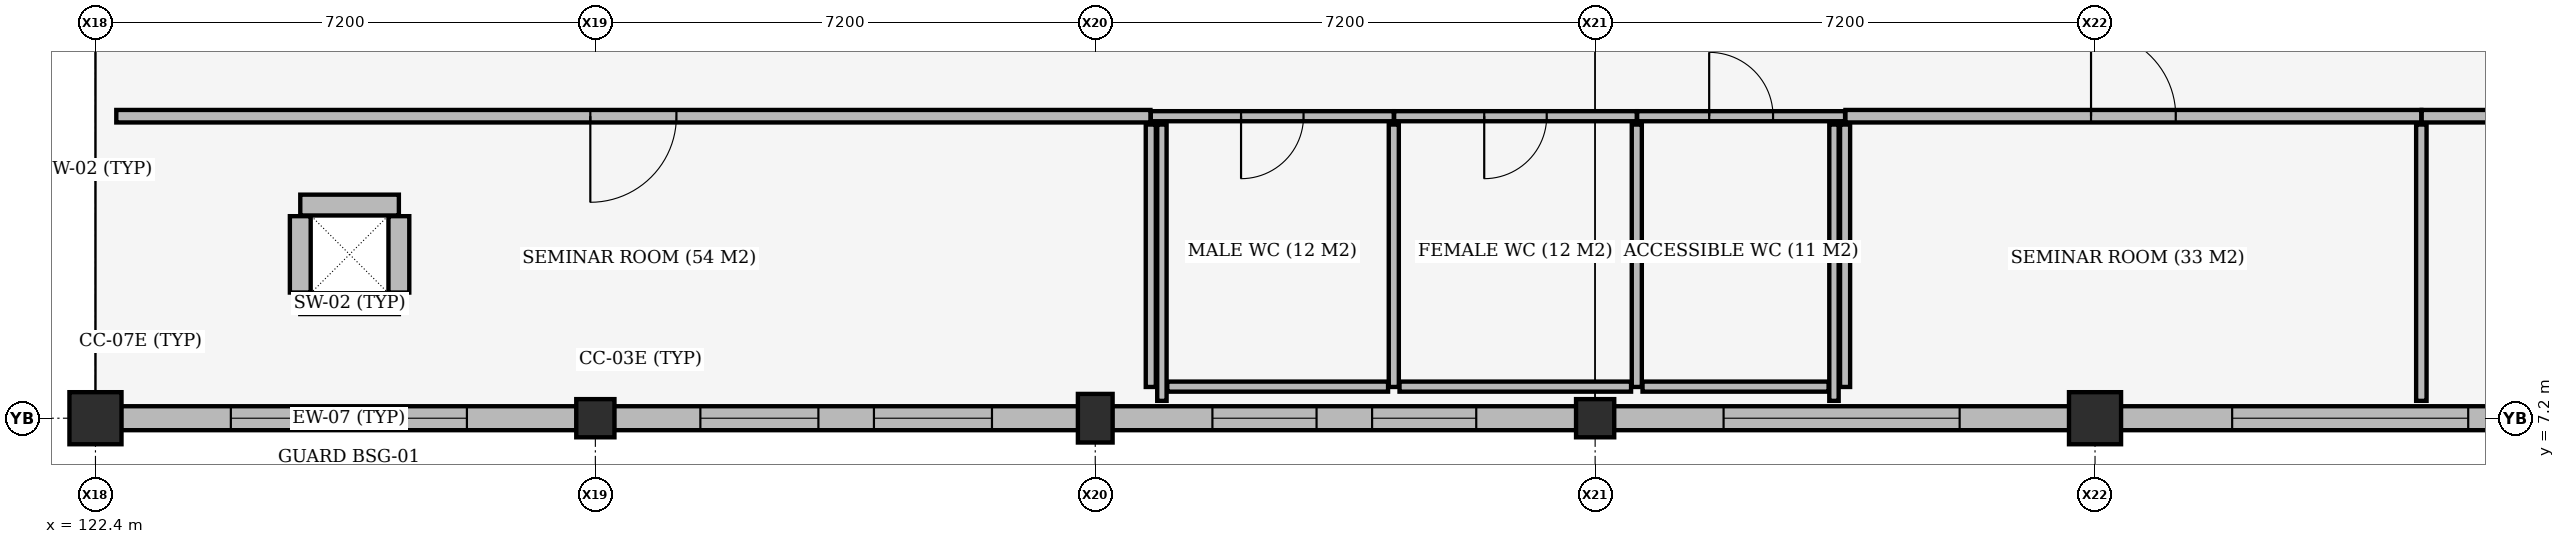
"""IFC4 building model, lengths in metres.
Left out: names, types, materials, properties, quantities, classifications, styles, units other than length and angle.
Written with IfcOpenShell. Run it as: python <this file> out.ifc"""

import sys

from ifc_helpers import new_model, si_unit, direction, frame, frame_2d, origin, origin_2d, place, context, subcontext, project, spatial, rectangle, extrude, element, fill, save


model = new_model("IFC4")
c1 = context("Model", 3, precision=1e-05, world=origin(), true_north=direction((0.0, 1.0)))
c2 = subcontext(c1, "Body", "Model", "MODEL_VIEW")
j1 = project(units=[si_unit("LENGTHUNIT", "METRE"), si_unit("PLANEANGLEUNIT", "RADIAN")], contexts=[c1])
p1 = place(None, origin())
s1 = spatial("IfcSite", under=j1, at=p1, CompositionType="ELEMENT")
p2 = place(p1, origin())
s2 = spatial("IfcBuilding", under=s1, at=p2, CompositionType="ELEMENT")
p3 = place(p2, frame((0.0, 0.0, 5.4)))
s3 = spatial("IfcBuildingStorey", under=s2, at=p3, CompositionType="ELEMENT", Elevation=5.4)
p4 = place(p3, frame((125.35, 8.85, 0.0), z_axis=(0.0, 0.0, 1.0), x_axis=(1.0, 0.0, 0.0)))
e1 = element("IfcWall", 1, at=p4, inside=s3, PredefinedType="SHEAR", context=c2, shape_type="SweptSolid", body=[
    extrude(rectangle(XDim=1.42, YDim=0.3, at=frame_2d((0.71, 0.0))), origin(), (0.0, 0.0, 1.0), 3.96),
])
p5 = place(p3, frame((126.77, 9.01, 0.0), z_axis=(0.0, 0.0, 1.0), x_axis=(0.0, 1.0, 0.0)))
e2 = element("IfcWall", 2, at=p5, inside=s3, PredefinedType="SHEAR", context=c2, shape_type="SweptSolid", body=[
    extrude(rectangle(XDim=1.1, YDim=0.3, at=frame_2d((0.55, 0.0))), origin(), (0.0, 0.0, 1.0), 3.96),
])
p6 = place(p3, frame((126.77, 10.27, 0.0), z_axis=(0.0, 0.0, 1.0), x_axis=(-1.0, 0.0, 0.0)))
e3 = element("IfcWall", 3, at=p6, inside=s3, PredefinedType="SHEAR", context=c2, shape_type="SweptSolid", body=[
    extrude(rectangle(XDim=1.42, YDim=0.3, at=frame_2d((0.71, 0.0))), origin(), (0.0, 0.0, 1.0), 3.96),
])
p7 = place(p3, frame((125.35, 10.11, 0.0), z_axis=(0.0, 0.0, 1.0), x_axis=(0.0, -1.0, 0.0)))
e4 = element("IfcWall", 4, at=p7, inside=s3, PredefinedType="SHEAR", context=c2, shape_type="SweptSolid", body=[
    extrude(rectangle(XDim=1.1, YDim=0.3, at=frame_2d((0.55, 0.0))), origin(), (0.0, 0.0, 1.0), 3.96),
])
p8 = place(p3, frame((122.4, 7.2, 0.0), z_axis=(0.0, 0.0, 1.0), x_axis=(1.0, 0.0, 0.0)))
e5 = element("IfcColumn", 5, at=p8, inside=s3, PredefinedType="COLUMN", context=c2, shape_type="SweptSolid", body=[
    extrude(rectangle(XDim=0.75, YDim=0.75, at=origin_2d()), origin(), (0.0, 0.0, 1.0), 3.85),
])
p9 = place(p3, frame((129.6, 7.2, 0.0), z_axis=(0.0, 0.0, 1.0), x_axis=(1.0, 0.0, 0.0)))
e6 = element("IfcColumn", 6, at=p9, inside=s3, PredefinedType="COLUMN", context=c2, shape_type="SweptSolid", body=[
    extrude(rectangle(XDim=0.55, YDim=0.55, at=origin_2d()), origin(), (0.0, 0.0, 1.0), 3.85),
])
p10 = place(p3, frame((136.8, 7.2, 0.0), z_axis=(0.0, 0.0, 1.0), x_axis=(1.0, 0.0, 0.0)))
e7 = element("IfcColumn", 7, at=p10, inside=s3, PredefinedType="COLUMN", context=c2, shape_type="SweptSolid", body=[
    extrude(rectangle(XDim=0.5, YDim=0.7, at=origin_2d()), origin(), (0.0, 0.0, 1.0), 3.85),
])
p11 = place(p3, frame((144.0, 7.2, 0.0), z_axis=(0.0, 0.0, 1.0), x_axis=(1.0, 0.0, 0.0)))
e8 = element("IfcColumn", 8, at=p11, inside=s3, PredefinedType="COLUMN", context=c2, shape_type="SweptSolid", body=[
    extrude(rectangle(XDim=0.55, YDim=0.55, at=origin_2d()), origin(), (0.0, 0.0, 1.0), 3.85),
])
p12 = place(p3, frame((151.2, 7.2, 0.0), z_axis=(0.0, 0.0, 1.0), x_axis=(1.0, 0.0, 0.0)))
e9 = element("IfcColumn", 9, at=p12, inside=s3, PredefinedType="COLUMN", context=c2, shape_type="SweptSolid", body=[
    extrude(rectangle(XDim=0.75, YDim=0.75, at=origin_2d()), origin(), (0.0, 0.0, 1.0), 3.85),
])
p13 = place(p3, frame((129.333, 7.2, 0.0), z_axis=(0.0, 0.0, 1.0), x_axis=(-1.0, 0.0, 0.0)))
e10 = element("IfcWall", 10, at=p13, inside=s3, PredefinedType="STANDARD", context=c2, shape_type="SweptSolid", body=[
    extrude(rectangle(XDim=6.566, YDim=0.345, at=frame_2d((3.283, 0.0))), origin(), (0.0, 0.0, 1.0), 3.33),
])
p14 = place(p13, frame((1.583, 0.0, 0.9)))
e11 = element("IfcOpeningElement", 11, at=p14, cuts=e10, PredefinedType="OPENING", context=c2, shape_type="SweptSolid", body=[
    extrude(rectangle(XDim=3.4, YDim=1.5, at=frame_2d((1.7, 0.75))), frame((0.0, 0.182, 0.0), z_axis=(0.0, -1.0, 0.0), x_axis=(1.0, 0.0, 0.0)), (0.0, 0.0, 1.0), 0.365),
])
p15 = place(p3, frame((136.558, 7.2, 0.0), z_axis=(0.0, 0.0, 1.0), x_axis=(-1.0, 0.0, 0.0)))
e12 = element("IfcWall", 12, at=p15, inside=s3, PredefinedType="STANDARD", context=c2, shape_type="SweptSolid", body=[
    extrude(rectangle(XDim=6.691, YDim=0.345, at=frame_2d((3.346, 0.0))), origin(), (0.0, 0.0, 1.0), 3.27),
])
p16 = place(p15, frame((1.246, 0.0, 0.95)))
e13 = element("IfcOpeningElement", 13, at=p16, cuts=e12, PredefinedType="OPENING", context=c2, shape_type="SweptSolid", body=[
    extrude(rectangle(XDim=1.7, YDim=2.1, at=frame_2d((0.85, 1.05))), frame((0.0, 0.182, 0.0), z_axis=(0.0, -1.0, 0.0), x_axis=(1.0, 0.0, 0.0)), (0.0, 0.0, 1.0), 0.365),
])
p17 = place(p15, frame((3.746, 0.0, 0.95)))
e14 = element("IfcOpeningElement", 14, at=p17, cuts=e12, PredefinedType="OPENING", context=c2, shape_type="SweptSolid", body=[
    extrude(rectangle(XDim=1.7, YDim=2.1, at=frame_2d((0.85, 1.05))), frame((0.0, 0.182, 0.0), z_axis=(0.0, -1.0, 0.0), x_axis=(1.0, 0.0, 0.0)), (0.0, 0.0, 1.0), 0.365),
])
p18 = place(p3, frame((143.733, 7.2, 0.0), z_axis=(0.0, 0.0, 1.0), x_axis=(-1.0, 0.0, 0.0)))
e15 = element("IfcWall", 15, at=p18, inside=s3, PredefinedType="STANDARD", context=c2, shape_type="SweptSolid", body=[
    extrude(rectangle(XDim=6.691, YDim=0.345, at=frame_2d((3.345, 0.0))), origin(), (0.0, 0.0, 1.0), 3.21),
])
p19 = place(p18, frame((1.446, 0.0, 0.95)))
e16 = element("IfcOpeningElement", 16, at=p19, cuts=e15, PredefinedType="OPENING", context=c2, shape_type="SweptSolid", body=[
    extrude(rectangle(XDim=1.5, YDim=2.1, at=frame_2d((0.75, 1.05))), frame((0.0, 0.182, 0.0), z_axis=(0.0, -1.0, 0.0), x_axis=(1.0, 0.0, 0.0)), (0.0, 0.0, 1.0), 0.365),
])
p20 = place(p18, frame((3.746, 0.0, 0.95)))
e17 = element("IfcOpeningElement", 17, at=p20, cuts=e15, PredefinedType="OPENING", context=c2, shape_type="SweptSolid", body=[
    extrude(rectangle(XDim=1.5, YDim=2.1, at=frame_2d((0.75, 1.05))), frame((0.0, 0.182, 0.0), z_axis=(0.0, -1.0, 0.0), x_axis=(1.0, 0.0, 0.0)), (0.0, 0.0, 1.0), 0.365),
])
p21 = place(p3, frame((150.833, 7.2, 0.0), z_axis=(0.0, 0.0, 1.0), x_axis=(-1.0, 0.0, 0.0)))
e18 = element("IfcWall", 18, at=p21, inside=s3, PredefinedType="STANDARD", context=c2, shape_type="SweptSolid", body=[
    extrude(rectangle(XDim=6.566, YDim=0.345, at=frame_2d((3.283, 0.0))), origin(), (0.0, 0.0, 1.0), 3.17),
])
p22 = place(p21, frame((1.583, 0.0, 0.9)))
e19 = element("IfcOpeningElement", 19, at=p22, cuts=e18, PredefinedType="OPENING", context=c2, shape_type="SweptSolid", body=[
    extrude(rectangle(XDim=3.4, YDim=1.5, at=frame_2d((1.7, 0.75))), frame((0.0, 0.182, 0.0), z_axis=(0.0, -1.0, 0.0), x_axis=(1.0, 0.0, 0.0)), (0.0, 0.0, 1.0), 0.365),
])
p23 = place(p3, frame((158.183, 7.2, 0.0), z_axis=(0.0, 0.0, 1.0), x_axis=(-1.0, 0.0, 0.0)))
e20 = element("IfcWall", 20, at=p23, inside=s3, PredefinedType="STANDARD", context=c2, shape_type="SweptSolid", body=[
    extrude(rectangle(XDim=6.616, YDim=0.345, at=frame_2d((3.308, 0.0))), origin(), (0.0, 0.0, 1.0), 3.11),
])
p24 = place(p23, frame((1.608, 0.0, 0.9)))
e21 = element("IfcOpeningElement", 21, at=p24, cuts=e20, PredefinedType="OPENING", context=c2, shape_type="SweptSolid", body=[
    extrude(rectangle(XDim=3.4, YDim=1.5, at=frame_2d((1.7, 0.75))), frame((0.0, 0.182, 0.0), z_axis=(0.0, -1.0, 0.0), x_axis=(1.0, 0.0, 0.0)), (0.0, 0.0, 1.0), 0.365),
])
p25 = place(p3, frame((137.6, 11.55, 0.0), z_axis=(0.0, 0.0, 1.0), x_axis=(1.0, 0.0, 0.0)))
e22 = element("IfcWall", 22, at=p25, inside=s3, PredefinedType="PLUMBINGWALL", context=c2, shape_type="SweptSolid", body=[
    extrude(rectangle(XDim=3.5, YDim=0.145, at=frame_2d((1.75, 0.0))), origin(), (0.0, 0.0, 1.0), 3.61),
])
p26 = place(p25, frame((1.3, 0.0, 0.0)))
e23 = element("IfcOpeningElement", 23, at=p26, cuts=e22, PredefinedType="OPENING", context=c2, shape_type="SweptSolid", body=[
    extrude(rectangle(XDim=0.9, YDim=2.1, at=frame_2d((0.45, 1.05))), frame((0.0, 0.083, 0.0), z_axis=(0.0, -1.0, 0.0), x_axis=(1.0, 0.0, 0.0)), (0.0, 0.0, 1.0), 0.165),
])
for number, where, z_axis, x_axis in (
    (24, (137.6, 7.65, 0.0), (0.0, 0.0, 1.0), (0.0, 1.0, 0.0)),
    (25, (141.1, 7.65, 0.0), (0.0, 0.0, 1.0), (0.0, 1.0, 0.0)),
):
    element("IfcWall", number, at=place(p3, frame(where, z_axis=z_axis, x_axis=x_axis)), inside=s3, PredefinedType="PLUMBINGWALL", context=c2, shape_type="SweptSolid", body=[
        extrude(rectangle(XDim=3.78, YDim=0.145, at=frame_2d((1.89, 0.0))), origin(), (0.0, 0.0, 1.0), 3.85),
    ])
p27 = place(p3, frame((141.105, 11.55, 0.0), z_axis=(0.0, 0.0, 1.0), x_axis=(1.0, 0.0, 0.0)))
e26 = element("IfcWall", 26, at=p27, inside=s3, PredefinedType="PLUMBINGWALL", context=c2, shape_type="SweptSolid", body=[
    extrude(rectangle(XDim=3.495, YDim=0.145, at=frame_2d((1.748, 0.0))), origin(), (0.0, 0.0, 1.0), 3.21),
])
p28 = place(p27, frame((1.298, 0.0, 0.0)))
e27 = element("IfcOpeningElement", 27, at=p28, cuts=e26, PredefinedType="OPENING", context=c2, shape_type="SweptSolid", body=[
    extrude(rectangle(XDim=0.9, YDim=2.1, at=frame_2d((0.45, 1.05))), frame((0.0, 0.083, 0.0), z_axis=(0.0, -1.0, 0.0), x_axis=(1.0, 0.0, 0.0)), (0.0, 0.0, 1.0), 0.165),
])
p29 = place(p3, frame((144.6, 7.65, 0.0), z_axis=(0.0, 0.0, 1.0), x_axis=(0.0, 1.0, 0.0)))
e28 = element("IfcWall", 28, at=p29, inside=s3, PredefinedType="PLUMBINGWALL", context=c2, shape_type="SweptSolid", body=[
    extrude(rectangle(XDim=3.78, YDim=0.145, at=frame_2d((1.89, 0.0))), origin(), (0.0, 0.0, 1.0), 3.85),
])
p30 = place(p3, frame((144.605, 11.55, 0.0), z_axis=(0.0, 0.0, 1.0), x_axis=(1.0, 0.0, 0.0)))
e29 = element("IfcWall", 29, at=p30, inside=s3, PredefinedType="PLUMBINGWALL", context=c2, shape_type="SweptSolid", body=[
    extrude(rectangle(XDim=2.995, YDim=0.145, at=frame_2d((1.498, 0.0))), origin(), (0.0, 0.0, 1.0), 3.49),
])
p31 = place(p30, frame((1.038, 0.0, 0.0)))
e30 = element("IfcOpeningElement", 30, at=p31, cuts=e29, PredefinedType="OPENING", context=c2, shape_type="SweptSolid", body=[
    extrude(rectangle(XDim=0.92, YDim=2.1, at=frame_2d((0.46, 1.05))), frame((0.0, 0.083, 0.0), z_axis=(0.0, -1.0, 0.0), x_axis=(1.0, 0.0, 0.0)), (0.0, 0.0, 1.0), 0.165),
])
p32 = place(p3, frame((147.6, 7.65, 0.0), z_axis=(0.0, 0.0, 1.0), x_axis=(0.0, 1.0, 0.0)))
e31 = element("IfcWall", 31, at=p32, inside=s3, PredefinedType="PLUMBINGWALL", context=c2, shape_type="SweptSolid", body=[
    extrude(rectangle(XDim=3.78, YDim=0.145, at=frame_2d((1.89, 0.0))), origin(), (0.0, 0.0, 1.0), 3.85),
])
p33 = place(p3, frame((122.7, 11.55, 0.0), z_axis=(0.0, 0.0, 1.0), x_axis=(1.0, 0.0, 0.0)))
e32 = element("IfcWall", 32, at=p33, inside=s3, PredefinedType="PARTITIONING", context=c2, shape_type="SweptSolid", body=[
    extrude(rectangle(XDim=14.895, YDim=0.18, at=frame_2d((7.448, 0.0))), origin(), (0.0, 0.0, 1.0), 3.27),
])
p34 = place(p33, frame((6.827, 0.0, 0.0)))
e33 = element("IfcOpeningElement", 33, at=p34, cuts=e32, PredefinedType="OPENING", context=c2, shape_type="SweptSolid", body=[
    extrude(rectangle(XDim=1.24, YDim=2.25, at=frame_2d((0.62, 1.125))), frame((0.0, 0.1, 0.0), z_axis=(0.0, -1.0, 0.0), x_axis=(1.0, 0.0, 0.0)), (0.0, 0.0, 1.0), 0.2),
])
p35 = place(p3, frame((137.76, 7.45, 0.0), z_axis=(0.0, 0.0, 1.0), x_axis=(0.0, 1.0, 0.0)))
e34 = element("IfcWall", 34, at=p35, inside=s3, PredefinedType="PARTITIONING", context=c2, shape_type="SweptSolid", body=[
    extrude(rectangle(XDim=3.98, YDim=0.135, at=frame_2d((1.99, 0.0))), origin(), (0.0, 0.0, 1.0), 3.85),
])
p36 = place(p3, frame((147.605, 11.55, 0.0), z_axis=(0.0, 0.0, 1.0), x_axis=(1.0, 0.0, 0.0)))
e35 = element("IfcWall", 35, at=p36, inside=s3, PredefinedType="PARTITIONING", context=c2, shape_type="SweptSolid", body=[
    extrude(rectangle(XDim=8.295, YDim=0.18, at=frame_2d((4.147, 0.0))), origin(), (0.0, 0.0, 1.0), 3.11),
])
p37 = place(p36, frame((3.538, 0.0, 0.0)))
e36 = element("IfcOpeningElement", 36, at=p37, cuts=e35, PredefinedType="OPENING", context=c2, shape_type="SweptSolid", body=[
    extrude(rectangle(XDim=1.22, YDim=2.25, at=frame_2d((0.61, 1.125))), frame((0.0, 0.1, 0.0), z_axis=(0.0, -1.0, 0.0), x_axis=(1.0, 0.0, 0.0)), (0.0, 0.0, 1.0), 0.2),
])
p38 = place(p3, frame((147.44, 7.45, 0.0), z_axis=(0.0, 0.0, 1.0), x_axis=(0.0, 1.0, 0.0)))
e37 = element("IfcWall", 37, at=p38, inside=s3, PredefinedType="PARTITIONING", context=c2, shape_type="SweptSolid", body=[
    extrude(rectangle(XDim=3.98, YDim=0.135, at=frame_2d((1.99, 0.0))), origin(), (0.0, 0.0, 1.0), 3.85),
])
p39 = place(p3, frame((155.9, 7.45, 0.0), z_axis=(0.0, 0.0, 1.0), x_axis=(0.0, 1.0, 0.0)))
e38 = element("IfcWall", 38, at=p39, inside=s3, PredefinedType="PARTITIONING", context=c2, shape_type="SweptSolid", body=[
    extrude(rectangle(XDim=3.98, YDim=0.15, at=frame_2d((1.99, 0.0))), origin(), (0.0, 0.0, 1.0), 3.61),
])
p40 = place(p3, frame((155.905, 11.55, 0.0), z_axis=(0.0, 0.0, 1.0), x_axis=(1.0, 0.0, 0.0)))
e39 = element("IfcWall", 39, at=p40, inside=s3, PredefinedType="PARTITIONING", context=c2, shape_type="SweptSolid", body=[
    extrude(rectangle(XDim=16.595, YDim=0.18, at=frame_2d((8.297, 0.0))), origin(), (0.0, 0.0, 1.0), 3.21),
])
p41 = place(p40, frame((7.677, 0.0, 0.0)))
e40 = element("IfcOpeningElement", 40, at=p41, cuts=e39, PredefinedType="OPENING", context=c2, shape_type="SweptSolid", body=[
    extrude(rectangle(XDim=1.24, YDim=2.25, at=frame_2d((0.62, 1.125))), frame((0.0, 0.1, 0.0), z_axis=(0.0, -1.0, 0.0), x_axis=(1.0, 0.0, 0.0)), (0.0, 0.0, 1.0), 0.2),
])
p42 = place(p3, frame((137.837, 7.655, 0.0), z_axis=(0.0, 0.0, 1.0), x_axis=(1.0, 0.0, 0.0)))
e41 = element("IfcWall", 41, at=p42, inside=s3, PredefinedType="PLUMBINGWALL", context=c2, shape_type="SweptSolid", body=[
    extrude(rectangle(XDim=3.18, YDim=0.145, at=frame_2d((1.59, 0.0))), origin(), (0.0, 0.0, 1.0), 3.61),
])
p43 = place(p3, frame((141.183, 7.655, 0.0), z_axis=(0.0, 0.0, 1.0), x_axis=(1.0, 0.0, 0.0)))
e42 = element("IfcWall", 42, at=p43, inside=s3, PredefinedType="PLUMBINGWALL", context=c2, shape_type="SweptSolid", body=[
    extrude(rectangle(XDim=3.335, YDim=0.145, at=frame_2d((1.667, 0.0))), origin(), (0.0, 0.0, 1.0), 3.21),
])
p44 = place(p3, frame((144.683, 7.655, 0.0), z_axis=(0.0, 0.0, 1.0), x_axis=(1.0, 0.0, 0.0)))
e43 = element("IfcWall", 43, at=p44, inside=s3, PredefinedType="PLUMBINGWALL", context=c2, shape_type="SweptSolid", body=[
    extrude(rectangle(XDim=2.68, YDim=0.145, at=frame_2d((1.34, 0.0))), origin(), (0.0, 0.0, 1.0), 3.49),
])
p45 = place(p14, origin())
e44 = element("IfcWindow", 44, at=p45, inside=s3, PartitioningType="DOUBLE_PANEL_VERTICAL", PredefinedType="WINDOW", context=c2, shape_type="SweptSolid", body=[
    extrude(rectangle(XDim=3.4, YDim=1.5, at=frame_2d((1.7, 0.75))), frame((0.0, 0.03, 0.0), z_axis=(0.0, -1.0, 0.0), x_axis=(1.0, 0.0, 0.0)), (0.0, 0.0, 1.0), 0.06),
])
fill(e11, e44)
p46 = place(p16, origin())
e45 = element("IfcWindow", 45, at=p46, inside=s3, PartitioningType="DOUBLE_PANEL_VERTICAL", PredefinedType="WINDOW", context=c2, shape_type="SweptSolid", body=[
    extrude(rectangle(XDim=1.7, YDim=2.1, at=frame_2d((0.85, 1.05))), frame((0.0, 0.03, 0.0), z_axis=(0.0, -1.0, 0.0), x_axis=(1.0, 0.0, 0.0)), (0.0, 0.0, 1.0), 0.06),
])
fill(e13, e45)
p47 = place(p17, origin())
e46 = element("IfcWindow", 46, at=p47, inside=s3, PartitioningType="DOUBLE_PANEL_VERTICAL", PredefinedType="WINDOW", context=c2, shape_type="SweptSolid", body=[
    extrude(rectangle(XDim=1.7, YDim=2.1, at=frame_2d((0.85, 1.05))), frame((0.0, 0.03, 0.0), z_axis=(0.0, -1.0, 0.0), x_axis=(1.0, 0.0, 0.0)), (0.0, 0.0, 1.0), 0.06),
])
fill(e14, e46)
p48 = place(p19, origin())
e47 = element("IfcWindow", 47, at=p48, inside=s3, PartitioningType="DOUBLE_PANEL_VERTICAL", PredefinedType="WINDOW", context=c2, shape_type="SweptSolid", body=[
    extrude(rectangle(XDim=1.5, YDim=2.1, at=frame_2d((0.75, 1.05))), frame((0.0, 0.03, 0.0), z_axis=(0.0, -1.0, 0.0), x_axis=(1.0, 0.0, 0.0)), (0.0, 0.0, 1.0), 0.06),
])
fill(e16, e47)
p49 = place(p20, origin())
e48 = element("IfcWindow", 48, at=p49, inside=s3, PartitioningType="DOUBLE_PANEL_VERTICAL", PredefinedType="WINDOW", context=c2, shape_type="SweptSolid", body=[
    extrude(rectangle(XDim=1.5, YDim=2.1, at=frame_2d((0.75, 1.05))), frame((0.0, 0.03, 0.0), z_axis=(0.0, -1.0, 0.0), x_axis=(1.0, 0.0, 0.0)), (0.0, 0.0, 1.0), 0.06),
])
fill(e17, e48)
p50 = place(p22, origin())
e49 = element("IfcWindow", 49, at=p50, inside=s3, PartitioningType="DOUBLE_PANEL_VERTICAL", PredefinedType="WINDOW", context=c2, shape_type="SweptSolid", body=[
    extrude(rectangle(XDim=3.4, YDim=1.5, at=frame_2d((1.7, 0.75))), frame((0.0, 0.03, 0.0), z_axis=(0.0, -1.0, 0.0), x_axis=(1.0, 0.0, 0.0)), (0.0, 0.0, 1.0), 0.06),
])
fill(e19, e49)
p51 = place(p24, origin())
e50 = element("IfcWindow", 50, at=p51, inside=s3, PartitioningType="DOUBLE_PANEL_VERTICAL", PredefinedType="WINDOW", context=c2, shape_type="SweptSolid", body=[
    extrude(rectangle(XDim=3.4, YDim=1.5, at=frame_2d((1.7, 0.75))), frame((0.0, 0.03, 0.0), z_axis=(0.0, -1.0, 0.0), x_axis=(1.0, 0.0, 0.0)), (0.0, 0.0, 1.0), 0.06),
])
fill(e21, e50)
p52 = place(p26, origin())
e51 = element("IfcDoor", 51, at=p52, inside=s3, OperationType="SINGLE_SWING_RIGHT", PredefinedType="DOOR", context=c2, shape_type="SweptSolid", body=[
    extrude(rectangle(XDim=0.9, YDim=2.1, at=frame_2d((0.45, 1.05))), frame((0.0, 0.025, 0.0), z_axis=(0.0, -1.0, 0.0), x_axis=(1.0, 0.0, 0.0)), (0.0, 0.0, 1.0), 0.05),
])
fill(e23, e51)
p53 = place(p28, origin())
e52 = element("IfcDoor", 52, at=p53, inside=s3, OperationType="SINGLE_SWING_RIGHT", PredefinedType="DOOR", context=c2, shape_type="SweptSolid", body=[
    extrude(rectangle(XDim=0.9, YDim=2.1, at=frame_2d((0.45, 1.05))), frame((0.0, 0.025, 0.0), z_axis=(0.0, -1.0, 0.0), x_axis=(1.0, 0.0, 0.0)), (0.0, 0.0, 1.0), 0.05),
])
fill(e27, e52)
p54 = place(p31, origin())
e53 = element("IfcDoor", 53, at=p54, inside=s3, OperationType="SINGLE_SWING_LEFT", PredefinedType="DOOR", context=c2, shape_type="SweptSolid", body=[
    extrude(rectangle(XDim=0.92, YDim=2.1, at=frame_2d((0.46, 1.05))), frame((0.0, 0.025, 0.0), z_axis=(0.0, -1.0, 0.0), x_axis=(1.0, 0.0, 0.0)), (0.0, 0.0, 1.0), 0.05),
])
fill(e30, e53)
p55 = place(p34, origin())
e54 = element("IfcDoor", 54, at=p55, inside=s3, OperationType="SINGLE_SWING_RIGHT", PredefinedType="DOOR", context=c2, shape_type="SweptSolid", body=[
    extrude(rectangle(XDim=1.24, YDim=2.25, at=frame_2d((0.62, 1.125))), frame((0.0, 0.025, 0.0), z_axis=(0.0, -1.0, 0.0), x_axis=(1.0, 0.0, 0.0)), (0.0, 0.0, 1.0), 0.05),
])
fill(e33, e54)
p56 = place(p37, origin())
e55 = element("IfcDoor", 55, at=p56, inside=s3, OperationType="SINGLE_SWING_LEFT", PredefinedType="DOOR", context=c2, shape_type="SweptSolid", body=[
    extrude(rectangle(XDim=1.22, YDim=2.25, at=frame_2d((0.61, 1.125))), frame((0.0, 0.025, 0.0), z_axis=(0.0, -1.0, 0.0), x_axis=(1.0, 0.0, 0.0)), (0.0, 0.0, 1.0), 0.05),
])
fill(e36, e55)
save(model, sys.argv[1])
